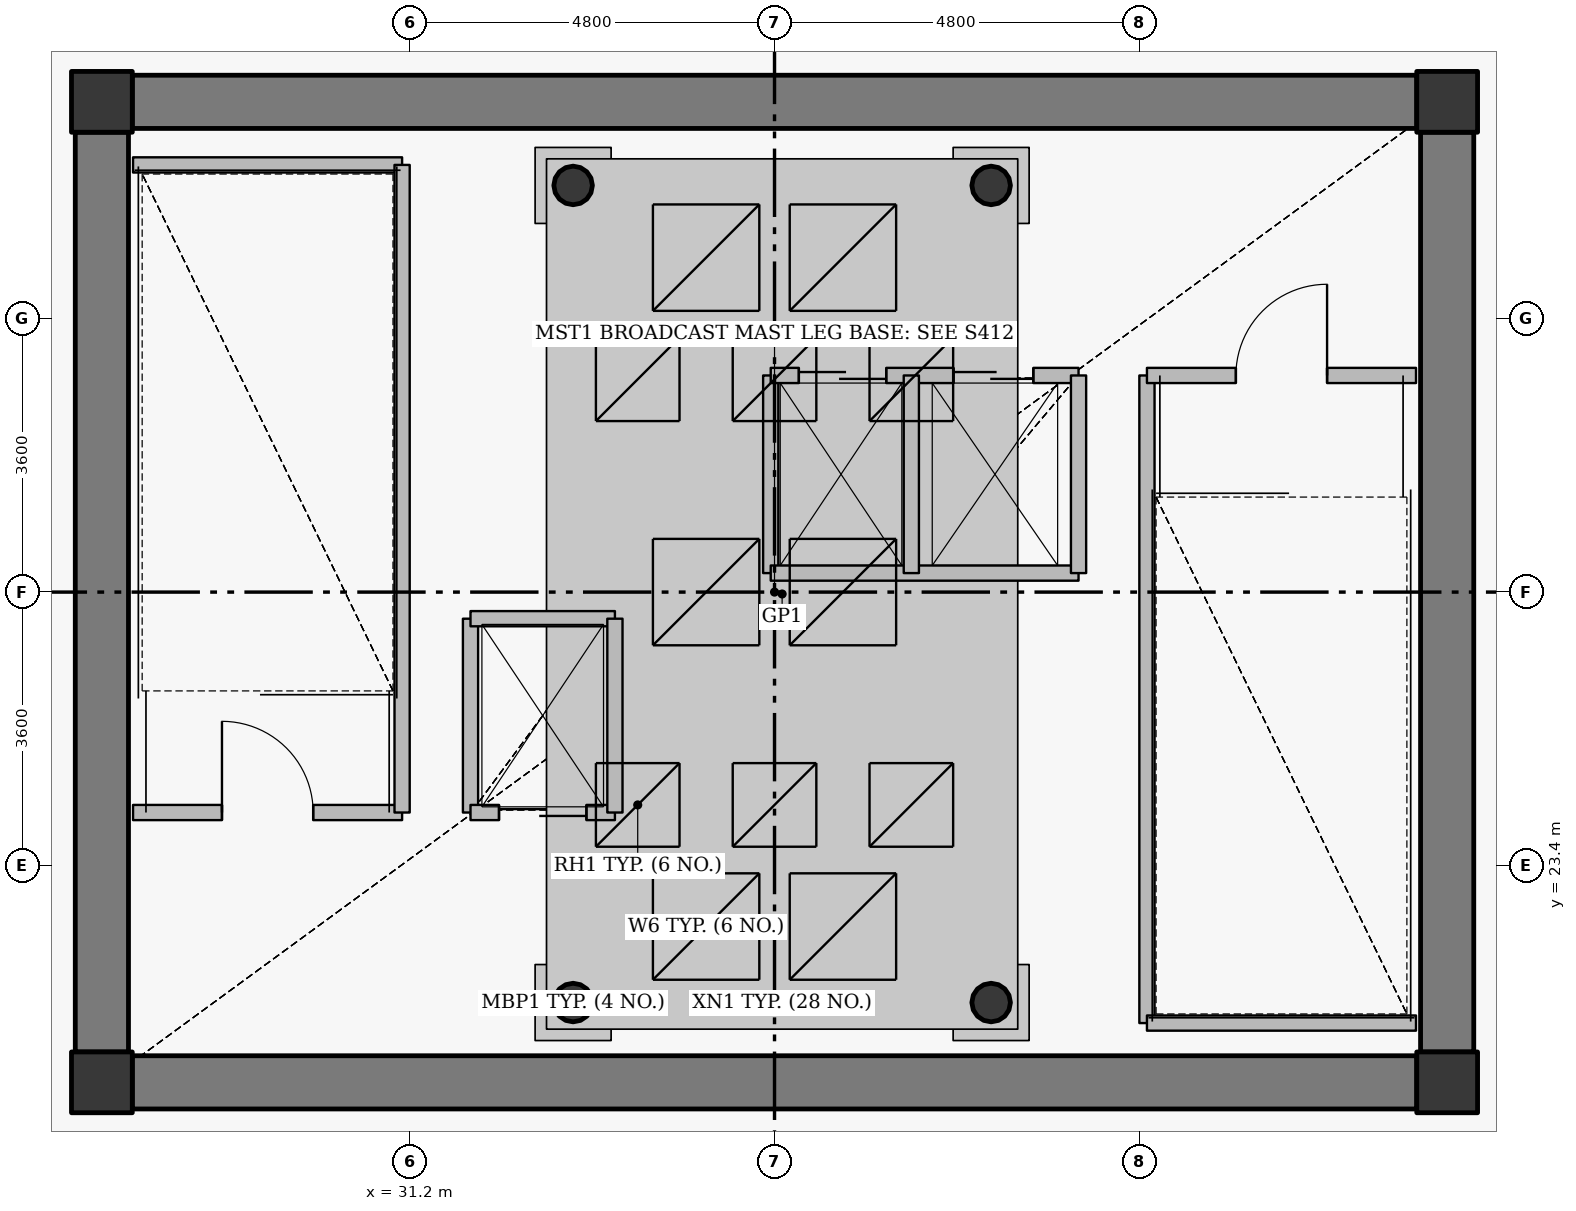
"""IFC4 building model, lengths in metres.
Left out: names, types, materials, properties, quantities, classifications, styles, units other than length and angle.
Written with IfcOpenShell. Run it as: python <this file> out.ifc"""

import sys

from ifc_helpers import new_model, si_unit, direction, frame, frame_2d, origin, origin_2d, place, context, subcontext, project, spatial, rectangle, hollow_circle, extrude, source, transform, mapped, element, fill, save


model = new_model("IFC4")
c1 = context("Model", 3, precision=1e-05, world=origin(), true_north=direction((0.0, 1.0)))
c2 = subcontext(c1, "Body", "Model", "MODEL_VIEW")
j1 = project(units=[si_unit("LENGTHUNIT", "METRE"), si_unit("PLANEANGLEUNIT", "RADIAN")], contexts=[c1])
p1 = place(None, origin())
s1 = spatial("IfcSite", under=j1, at=p1, CompositionType="ELEMENT")
p2 = place(p1, origin())
s2 = spatial("IfcBuilding", under=s1, at=p2, CompositionType="ELEMENT")
p3 = place(p2, frame((0.0, 0.0, 373.2)))
s3 = spatial("IfcBuildingStorey", under=s2, at=p3, CompositionType="ELEMENT", Elevation=373.2)
for number, where, z_axis, x_axis in (
    (1, (27.15, 20.55, 0.0), (0.0, 0.0, 1.0), (1.0, 0.0, 0.0)),
    (2, (44.85, 20.55, 0.0), (0.0, 0.0, 1.0), (1.0, 0.0, 0.0)),
    (3, (44.85, 33.45, 0.0), (0.0, 0.0, 1.0), (1.0, 0.0, 0.0)),
    (4, (27.15, 33.45, 0.0), (0.0, 0.0, 1.0), (1.0, 0.0, 0.0)),
):
    element("IfcColumn", number, at=place(p3, frame(where, z_axis=z_axis, x_axis=x_axis)), inside=s3, PredefinedType="COLUMN", context=c2, shape_type="SweptSolid", body=[
        extrude(rectangle(XDim=0.8, YDim=0.8, at=origin_2d()), origin(), (0.0, 0.0, 1.0), 3.4),
    ])
p4 = place(p3, frame((27.55, 33.45, 0.0), z_axis=(0.0, 0.0, 1.0), x_axis=(1.0, 0.0, 0.0)))
e5 = element("IfcWall", 5, at=p4, inside=s3, PredefinedType="SHEAR", context=c2, shape_type="SweptSolid", body=[
    extrude(rectangle(XDim=16.9, YDim=0.7, at=frame_2d((8.45, 0.0))), origin(), (0.0, 0.0, 1.0), 2.75),
])
p5 = place(p3, frame((44.85, 33.05, 0.0), z_axis=(0.0, 0.0, 1.0), x_axis=(0.0, -1.0, 0.0)))
e6 = element("IfcWall", 6, at=p5, inside=s3, PredefinedType="SHEAR", context=c2, shape_type="SweptSolid", body=[
    extrude(rectangle(XDim=12.1, YDim=0.7, at=frame_2d((6.05, 0.0))), origin(), (0.0, 0.0, 1.0), 2.75),
])
p6 = place(p3, frame((44.45, 20.55, 0.0), z_axis=(0.0, 0.0, 1.0), x_axis=(-1.0, 0.0, 0.0)))
e7 = element("IfcWall", 7, at=p6, inside=s3, PredefinedType="SHEAR", context=c2, shape_type="SweptSolid", body=[
    extrude(rectangle(XDim=16.9, YDim=0.7, at=frame_2d((8.45, 0.0))), origin(), (0.0, 0.0, 1.0), 2.75),
])
p7 = place(p3, frame((27.15, 20.95, 0.0), z_axis=(0.0, 0.0, 1.0), x_axis=(0.0, 1.0, 0.0)))
e8 = element("IfcWall", 8, at=p7, inside=s3, PredefinedType="SHEAR", context=c2, shape_type="SweptSolid", body=[
    extrude(rectangle(XDim=12.1, YDim=0.7, at=frame_2d((6.05, 0.0))), origin(), (0.0, 0.0, 1.0), 2.75),
])
for number, where, z_axis, x_axis in (
    (9, (33.35, 21.6, 0.0), (0.0, 0.0, 1.0), (1.0, 0.0, 0.0)),
    (10, (38.85, 21.6, 0.0), (0.0, 0.0, 1.0), (1.0, 0.0, 0.0)),
    (11, (38.85, 32.35, 0.0), (0.0, 0.0, 1.0), (1.0, 0.0, 0.0)),
    (12, (33.35, 32.35, 0.0), (0.0, 0.0, 1.0), (1.0, 0.0, 0.0)),
):
    element("IfcColumn", number, at=place(p3, frame(where, z_axis=z_axis, x_axis=x_axis)), inside=s3, PredefinedType="USERDEFINED", context=c2, shape_type="SweptSolid", body=[
        extrude(hollow_circle(Radius=0.254, WallThickness=0.02, at=origin_2d()), origin(), (0.0, 0.0, 1.0), 32.76),
    ])
p8 = place(p3, frame((27.56, 24.1, 0.0), z_axis=(0.0, 0.0, 1.0), x_axis=(1.0, 0.0, 0.0)))
e13 = element("IfcWall", 13, at=p8, inside=s3, PredefinedType="PARTITIONING", context=c2, shape_type="SweptSolid", body=[
    extrude(rectangle(XDim=3.54, YDim=0.2, at=frame_2d((1.77, 0.0))), origin(), (0.0, 0.0, 1.0), 3.15),
])
p9 = place(p8, frame((1.17, 0.0, 0.0)))
e14 = element("IfcOpeningElement", 14, at=p9, cuts=e13, PredefinedType="OPENING", context=c2, shape_type="SweptSolid", body=[
    extrude(rectangle(XDim=1.2, YDim=2.15, at=origin_2d()), frame((0.6, 0.11, 1.075), z_axis=(0.0, -1.0, 0.0), x_axis=(1.0, 0.0, 0.0)), (0.0, 0.0, 1.0), 0.22),
])
p10 = place(p3, frame((27.56, 32.62, 0.0), z_axis=(0.0, 0.0, 1.0), x_axis=(1.0, 0.0, 0.0)))
e15 = element("IfcWall", 15, at=p10, inside=s3, PredefinedType="PARTITIONING", context=c2, shape_type="SweptSolid", body=[
    extrude(rectangle(XDim=3.54, YDim=0.2, at=frame_2d((1.77, 0.0))), origin(), (0.0, 0.0, 1.0), 3.15),
])
p11 = place(p3, frame((31.1, 24.1, 0.0), z_axis=(0.0, 0.0, 1.0), x_axis=(0.0, 1.0, 0.0)))
e16 = element("IfcWall", 16, at=p11, inside=s3, PredefinedType="PARTITIONING", context=c2, shape_type="SweptSolid", body=[
    extrude(rectangle(XDim=8.52, YDim=0.2, at=frame_2d((4.26, 0.0))), origin(), (0.0, 0.0, 1.0), 3.15),
])
p12 = place(p3, frame((32.0, 24.1, 0.0), z_axis=(0.0, 0.0, 1.0), x_axis=(0.0, 1.0, 0.0)))
e17 = element("IfcWall", 17, at=p12, inside=s3, PredefinedType="PARTITIONING", context=c2, shape_type="SweptSolid", body=[
    extrude(rectangle(XDim=2.55, YDim=0.2, at=frame_2d((1.275, 0.0))), origin(), (0.0, 0.0, 1.0), 3.15),
])
p13 = place(p3, frame((32.0, 24.1, 0.0), z_axis=(0.0, 0.0, 1.0), x_axis=(1.0, 0.0, 0.0)))
e18 = element("IfcWall", 18, at=p13, inside=s3, PredefinedType="PARTITIONING", context=c2, shape_type="SweptSolid", body=[
    extrude(rectangle(XDim=1.9, YDim=0.2, at=frame_2d((0.95, 0.0))), origin(), (0.0, 0.0, 1.0), 3.15),
])
p14 = place(p13, frame((0.375, 0.0, 0.0)))
e19 = element("IfcOpeningElement", 19, at=p14, cuts=e18, PredefinedType="OPENING", context=c2, shape_type="SweptSolid", body=[
    extrude(rectangle(XDim=1.15, YDim=2.15, at=origin_2d()), frame((0.575, 0.11, 1.075), z_axis=(0.0, -1.0, 0.0), x_axis=(1.0, 0.0, 0.0)), (0.0, 0.0, 1.0), 0.22),
])
p15 = place(p3, frame((32.0, 26.65, 0.0), z_axis=(0.0, 0.0, 1.0), x_axis=(1.0, 0.0, 0.0)))
e20 = element("IfcWall", 20, at=p15, inside=s3, PredefinedType="PARTITIONING", context=c2, shape_type="SweptSolid", body=[
    extrude(rectangle(XDim=1.9, YDim=0.2, at=frame_2d((0.95, 0.0))), origin(), (0.0, 0.0, 1.0), 3.15),
])
p16 = place(p3, frame((33.9, 24.1, 0.0), z_axis=(0.0, 0.0, 1.0), x_axis=(0.0, 1.0, 0.0)))
e21 = element("IfcWall", 21, at=p16, inside=s3, PredefinedType="PARTITIONING", context=c2, shape_type="SweptSolid", body=[
    extrude(rectangle(XDim=2.55, YDim=0.2, at=frame_2d((1.275, 0.0))), origin(), (0.0, 0.0, 1.0), 3.15),
])
p17 = place(p3, frame((35.95, 27.25, 0.0), z_axis=(0.0, 0.0, 1.0), x_axis=(0.0, 1.0, 0.0)))
e22 = element("IfcWall", 22, at=p17, inside=s3, PredefinedType="PARTITIONING", context=c2, shape_type="SweptSolid", body=[
    extrude(rectangle(XDim=2.6, YDim=0.2, at=frame_2d((1.3, 0.0))), origin(), (0.0, 0.0, 1.0), 3.15),
])
p18 = place(p3, frame((35.95, 27.25, 0.0), z_axis=(0.0, 0.0, 1.0), x_axis=(1.0, 0.0, 0.0)))
e23 = element("IfcWall", 23, at=p18, inside=s3, PredefinedType="PARTITIONING", context=c2, shape_type="SweptSolid", body=[
    extrude(rectangle(XDim=4.05, YDim=0.2, at=frame_2d((2.025, 0.0))), origin(), (0.0, 0.0, 1.0), 3.15),
])
p19 = place(p3, frame((35.95, 29.85, 0.0), z_axis=(0.0, 0.0, 1.0), x_axis=(1.0, 0.0, 0.0)))
e24 = element("IfcWall", 24, at=p19, inside=s3, PredefinedType="PARTITIONING", context=c2, shape_type="SweptSolid", body=[
    extrude(rectangle(XDim=4.05, YDim=0.2, at=frame_2d((2.025, 0.0))), origin(), (0.0, 0.0, 1.0), 3.15),
])
p20 = place(p19, frame((0.37, 0.0, 0.0)))
e25 = element("IfcOpeningElement", 25, at=p20, cuts=e24, PredefinedType="OPENING", context=c2, shape_type="SweptSolid", body=[
    extrude(rectangle(XDim=1.15, YDim=2.15, at=origin_2d()), frame((0.575, 0.11, 1.075), z_axis=(0.0, -1.0, 0.0), x_axis=(1.0, 0.0, 0.0)), (0.0, 0.0, 1.0), 0.22),
])
p21 = place(p19, frame((2.405, 0.0, 0.0)))
e26 = element("IfcOpeningElement", 26, at=p21, cuts=e24, PredefinedType="OPENING", context=c2, shape_type="SweptSolid", body=[
    extrude(rectangle(XDim=1.05, YDim=2.15, at=origin_2d()), frame((0.525, 0.11, 1.075), z_axis=(0.0, -1.0, 0.0), x_axis=(1.0, 0.0, 0.0)), (0.0, 0.0, 1.0), 0.22),
])
for number, where, z_axis, x_axis in (
    (27, (37.8, 27.25, 0.0), (0.0, 0.0, 1.0), (0.0, 1.0, 0.0)),
    (28, (40.0, 27.25, 0.0), (0.0, 0.0, 1.0), (0.0, 1.0, 0.0)),
):
    element("IfcWall", number, at=place(p3, frame(where, z_axis=z_axis, x_axis=x_axis)), inside=s3, PredefinedType="PARTITIONING", context=c2, shape_type="SweptSolid", body=[
        extrude(rectangle(XDim=2.6, YDim=0.2, at=frame_2d((1.3, 0.0))), origin(), (0.0, 0.0, 1.0), 3.15),
    ])
p22 = place(p3, frame((40.9, 21.33, 0.0), z_axis=(0.0, 0.0, 1.0), x_axis=(0.0, 1.0, 0.0)))
e29 = element("IfcWall", 29, at=p22, inside=s3, PredefinedType="PARTITIONING", context=c2, shape_type="SweptSolid", body=[
    extrude(rectangle(XDim=8.52, YDim=0.2, at=frame_2d((4.26, 0.0))), origin(), (0.0, 0.0, 1.0), 3.15),
])
p23 = place(p3, frame((40.9, 21.33, 0.0), z_axis=(0.0, 0.0, 1.0), x_axis=(1.0, 0.0, 0.0)))
e30 = element("IfcWall", 30, at=p23, inside=s3, PredefinedType="PARTITIONING", context=c2, shape_type="SweptSolid", body=[
    extrude(rectangle(XDim=3.54, YDim=0.2, at=frame_2d((1.77, 0.0))), origin(), (0.0, 0.0, 1.0), 3.15),
])
p24 = place(p3, frame((40.9, 29.85, 0.0), z_axis=(0.0, 0.0, 1.0), x_axis=(1.0, 0.0, 0.0)))
e31 = element("IfcWall", 31, at=p24, inside=s3, PredefinedType="PARTITIONING", context=c2, shape_type="SweptSolid", body=[
    extrude(rectangle(XDim=3.54, YDim=0.2, at=frame_2d((1.77, 0.0))), origin(), (0.0, 0.0, 1.0), 3.15),
])
p25 = place(p24, frame((1.17, 0.0, 0.0)))
e32 = element("IfcOpeningElement", 32, at=p25, cuts=e31, PredefinedType="OPENING", context=c2, shape_type="SweptSolid", body=[
    extrude(rectangle(XDim=1.2, YDim=2.15, at=origin_2d()), frame((0.6, 0.11, 1.075), z_axis=(0.0, -1.0, 0.0), x_axis=(1.0, 0.0, 0.0)), (0.0, 0.0, 1.0), 0.22),
])
p26 = place(p3, frame((0.0, 0.0, 3.15)))
p27 = place(p26, frame((34.2, 24.2, -0.01)))
p28 = place(p27, frame((0.0, 0.0, 0.21)))
e33 = element("IfcWindow", 33, at=p28, inside=s3, PartitioningType="SINGLE_PANEL", PredefinedType="SKYLIGHT", context=c2, shape_type="SweptSolid", body=[
    extrude(rectangle(XDim=1.1, YDim=1.1, at=origin_2d()), origin(), (0.0, 0.0, 1.0), 0.05),
])
p29 = place(p26, frame((36.0, 24.2, -0.01)))
p30 = place(p29, frame((0.0, 0.0, 0.21)))
e34 = element("IfcWindow", 34, at=p30, inside=s3, PartitioningType="SINGLE_PANEL", PredefinedType="SKYLIGHT", context=c2, shape_type="SweptSolid", body=[
    extrude(rectangle(XDim=1.1, YDim=1.1, at=origin_2d()), origin(), (0.0, 0.0, 1.0), 0.05),
])
p31 = place(p26, frame((37.8, 24.2, -0.01)))
p32 = place(p31, frame((0.0, 0.0, 0.21)))
e35 = element("IfcWindow", 35, at=p32, inside=s3, PartitioningType="SINGLE_PANEL", PredefinedType="SKYLIGHT", context=c2, shape_type="SweptSolid", body=[
    extrude(rectangle(XDim=1.1, YDim=1.1, at=origin_2d()), origin(), (0.0, 0.0, 1.0), 0.05),
])
p33 = place(p26, frame((34.2, 29.8, -0.01)))
p34 = place(p33, frame((0.0, 0.0, 0.21)))
e36 = element("IfcWindow", 36, at=p34, inside=s3, PartitioningType="SINGLE_PANEL", PredefinedType="SKYLIGHT", context=c2, shape_type="SweptSolid", body=[
    extrude(rectangle(XDim=1.1, YDim=1.1, at=origin_2d()), origin(), (0.0, 0.0, 1.0), 0.05),
])
p35 = place(p26, frame((36.0, 29.8, -0.01)))
p36 = place(p35, frame((0.0, 0.0, 0.21)))
e37 = element("IfcWindow", 37, at=p36, inside=s3, PartitioningType="SINGLE_PANEL", PredefinedType="SKYLIGHT", context=c2, shape_type="SweptSolid", body=[
    extrude(rectangle(XDim=1.1, YDim=1.1, at=origin_2d()), origin(), (0.0, 0.0, 1.0), 0.05),
])
p37 = place(p26, frame((37.8, 29.8, -0.01)))
p38 = place(p37, frame((0.0, 0.0, 0.21)))
e38 = element("IfcWindow", 38, at=p38, inside=s3, PartitioningType="SINGLE_PANEL", PredefinedType="SKYLIGHT", context=c2, shape_type="SweptSolid", body=[
    extrude(rectangle(XDim=1.1, YDim=1.1, at=origin_2d()), origin(), (0.0, 0.0, 1.0), 0.05),
])
p39 = place(p26, frame((35.1, 22.6, -0.01)))
p40 = place(p39, frame((0.0, 0.0, 0.21)))
e39 = element("IfcWindow", 39, at=p40, inside=s3, PartitioningType="SINGLE_PANEL", PredefinedType="LIGHTDOME", context=c2, shape_type="SweptSolid", body=[
    extrude(rectangle(XDim=1.4, YDim=1.4, at=origin_2d()), origin(), (0.0, 0.0, 1.0), 0.05),
])
p41 = place(p26, frame((36.9, 22.6, -0.01)))
p42 = place(p41, frame((0.0, 0.0, 0.21)))
e40 = element("IfcWindow", 40, at=p42, inside=s3, PartitioningType="SINGLE_PANEL", PredefinedType="LIGHTDOME", context=c2, shape_type="SweptSolid", body=[
    extrude(rectangle(XDim=1.4, YDim=1.4, at=origin_2d()), origin(), (0.0, 0.0, 1.0), 0.05),
])
p43 = place(p26, frame((35.1, 27.0, -0.01)))
p44 = place(p43, frame((0.0, 0.0, 0.21)))
e41 = element("IfcWindow", 41, at=p44, inside=s3, PartitioningType="SINGLE_PANEL", PredefinedType="LIGHTDOME", context=c2, shape_type="SweptSolid", body=[
    extrude(rectangle(XDim=1.4, YDim=1.4, at=origin_2d()), origin(), (0.0, 0.0, 1.0), 0.05),
])
p45 = place(p26, frame((36.9, 27.0, -0.01)))
p46 = place(p45, frame((0.0, 0.0, 0.21)))
e42 = element("IfcWindow", 42, at=p46, inside=s3, PartitioningType="SINGLE_PANEL", PredefinedType="LIGHTDOME", context=c2, shape_type="SweptSolid", body=[
    extrude(rectangle(XDim=1.4, YDim=1.4, at=origin_2d()), origin(), (0.0, 0.0, 1.0), 0.05),
])
p47 = place(p26, frame((35.1, 31.4, -0.01)))
p48 = place(p47, frame((0.0, 0.0, 0.21)))
e43 = element("IfcWindow", 43, at=p48, inside=s3, PartitioningType="SINGLE_PANEL", PredefinedType="LIGHTDOME", context=c2, shape_type="SweptSolid", body=[
    extrude(rectangle(XDim=1.4, YDim=1.4, at=origin_2d()), origin(), (0.0, 0.0, 1.0), 0.05),
])
p49 = place(p26, frame((36.9, 31.4, -0.01)))
p50 = place(p49, frame((0.0, 0.0, 0.21)))
e44 = element("IfcWindow", 44, at=p50, inside=s3, PartitioningType="SINGLE_PANEL", PredefinedType="LIGHTDOME", context=c2, shape_type="SweptSolid", body=[
    extrude(rectangle(XDim=1.4, YDim=1.4, at=origin_2d()), origin(), (0.0, 0.0, 1.0), 0.05),
])
m1 = source(origin(), c2, "Body", "SweptSolid", [
    extrude(rectangle(XDim=1.2, YDim=2.15, at=origin_2d()), frame((0.6, 0.025, 1.075), z_axis=(0.0, -1.0, 0.0), x_axis=(1.0, 0.0, 0.0)), (0.0, 0.0, 1.0), 0.05),
])
p51 = place(p9, origin())
e45 = element("IfcDoor", 45, at=p51, inside=s3, OperationType="SINGLE_SWING_LEFT", PredefinedType="DOOR", context=c2, shape_type="MappedRepresentation", body=[
    mapped(m1, transform((0.0, 0.0, 0.0), x_axis=(1.0, 0.0, 0.0), y_axis=(0.0, 1.0, 0.0), z_axis=(0.0, 0.0, 1.0), scale=1.0)),
])
fill(e14, e45)
p52 = place(p25, origin())
e46 = element("IfcDoor", 46, at=p52, inside=s3, OperationType="SINGLE_SWING_RIGHT", PredefinedType="DOOR", context=c2, shape_type="MappedRepresentation", body=[
    mapped(m1, transform((0.0, 0.0, 0.0), x_axis=(1.0, 0.0, 0.0), y_axis=(0.0, 1.0, 0.0), z_axis=(0.0, 0.0, 1.0), scale=1.0)),
])
fill(e32, e46)
m2 = source(origin(), c2, "Body", "SweptSolid", [
    extrude(rectangle(XDim=1.15, YDim=2.15, at=origin_2d()), frame((0.575, 0.025, 1.075), z_axis=(0.0, -1.0, 0.0), x_axis=(1.0, 0.0, 0.0)), (0.0, 0.0, 1.0), 0.05),
])
p53 = place(p20, origin())
e47 = element("IfcDoor", 47, at=p53, inside=s3, OperationType="DOUBLE_DOOR_SLIDING", PredefinedType="USERDEFINED", context=c2, shape_type="MappedRepresentation", body=[
    mapped(m2, transform((0.0, 0.0, 0.0), x_axis=(1.0, 0.0, 0.0), y_axis=(0.0, 1.0, 0.0), z_axis=(0.0, 0.0, 1.0), scale=1.0)),
])
fill(e25, e47)
p54 = place(p14, origin())
e48 = element("IfcDoor", 48, at=p54, inside=s3, OperationType="DOUBLE_DOOR_SLIDING", PredefinedType="USERDEFINED", context=c2, shape_type="MappedRepresentation", body=[
    mapped(m2, transform((0.0, 0.0, 0.0), x_axis=(1.0, 0.0, 0.0), y_axis=(0.0, 1.0, 0.0), z_axis=(0.0, 0.0, 1.0), scale=1.0)),
])
fill(e19, e48)
m3 = source(origin(), c2, "Body", "SweptSolid", [
    extrude(rectangle(XDim=1.05, YDim=2.15, at=origin_2d()), frame((0.525, 0.025, 1.075), z_axis=(0.0, -1.0, 0.0), x_axis=(1.0, 0.0, 0.0)), (0.0, 0.0, 1.0), 0.05),
])
p55 = place(p21, origin())
e49 = element("IfcDoor", 49, at=p55, inside=s3, OperationType="DOUBLE_DOOR_SLIDING", PredefinedType="USERDEFINED", context=c2, shape_type="MappedRepresentation", body=[
    mapped(m3, transform((0.0, 0.0, 0.0), x_axis=(1.0, 0.0, 0.0), y_axis=(0.0, 1.0, 0.0), z_axis=(0.0, 0.0, 1.0), scale=1.0)),
])
fill(e26, e49)
save(model, sys.argv[1])
